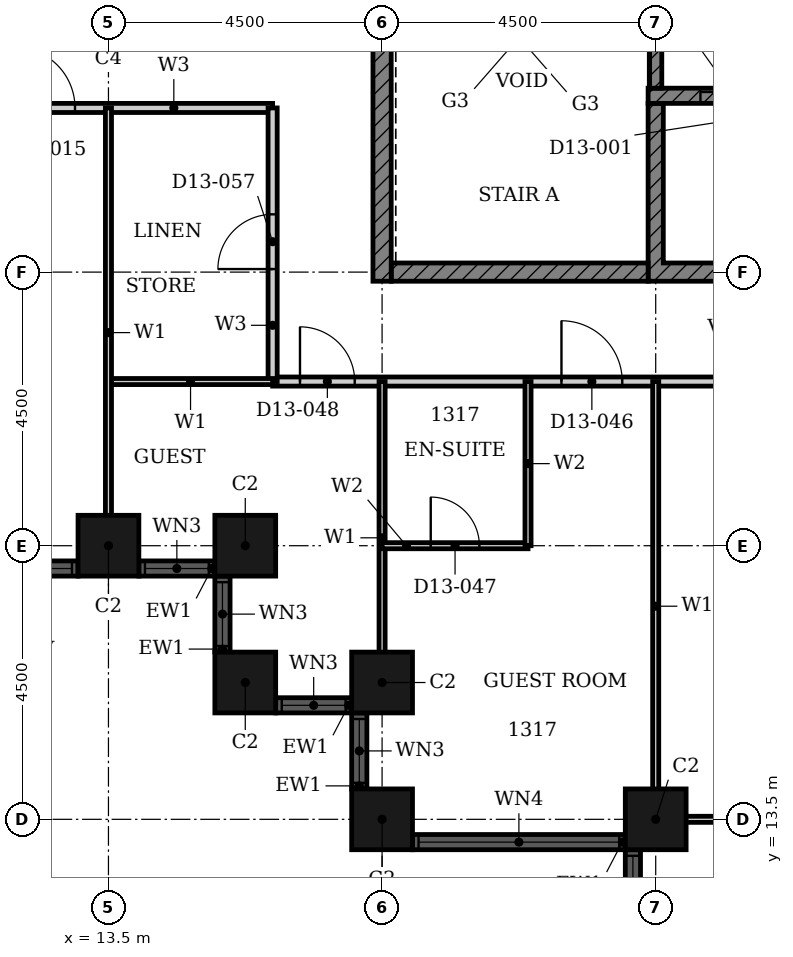
"""IFC4 building model, lengths in metres.
Left out: names, types, materials, properties, quantities, classifications, styles, units other than length and angle.
Written with IfcOpenShell. Run it as: python <this file> out.ifc"""

import sys

from ifc_helpers import new_model, si_unit, direction, frame, frame_2d, origin, origin_2d, place, context, subcontext, project, spatial, polyline, rectangle, hollow_rectangle, outline, extrude, element, fill, save


model = new_model("IFC4")
c1 = context("Model", 3, precision=1e-05, world=origin(), true_north=direction((0.0, 1.0)))
c2 = subcontext(c1, "Body", "Model", "MODEL_VIEW")
j1 = project(units=[si_unit("LENGTHUNIT", "METRE"), si_unit("PLANEANGLEUNIT", "RADIAN")], contexts=[c1])
p1 = place(None, origin())
s1 = spatial("IfcSite", under=j1, at=p1, CompositionType="ELEMENT")
p2 = place(p1, origin())
s2 = spatial("IfcBuilding", under=s1, at=p2, CompositionType="ELEMENT")
p3 = place(p2, frame((0.0, 0.0, 60.0)))
s3 = spatial("IfcBuildingStorey", under=s2, at=p3, CompositionType="ELEMENT", Elevation=60.0)
for number, where, z_axis, x_axis in (
    (1, (13.5, 18.0, 0.0), (0.0, 0.0, 1.0), (1.0, 0.0, 0.0)),
    (2, (15.75, 18.0, 0.0), (0.0, 0.0, 1.0), (1.0, 0.0, 0.0)),
    (3, (15.75, 15.75, 0.0), (0.0, 0.0, 1.0), (1.0, 0.0, 0.0)),
    (4, (18.0, 15.75, 0.0), (0.0, 0.0, 1.0), (1.0, 0.0, 0.0)),
    (5, (18.0, 13.5, 0.0), (0.0, 0.0, 1.0), (1.0, 0.0, 0.0)),
    (6, (22.5, 13.5, 0.0), (0.0, 0.0, 1.0), (1.0, 0.0, 0.0)),
):
    element("IfcColumn", number, at=place(p3, frame(where, z_axis=z_axis, x_axis=x_axis)), inside=s3, PredefinedType="COLUMN", context=c2, shape_type="SweptSolid", body=[
        extrude(hollow_rectangle(XDim=1.0, YDim=1.0, WallThickness=0.032, at=origin_2d()), origin(), (0.0, 0.0, 1.0), 3.6),
    ])
p4 = place(p3, frame((5.0, 17.625, 0.0), z_axis=(0.0, 0.0, 1.0), x_axis=(1.0, 0.0, 0.0)))
e7 = element("IfcWall", 7, at=p4, inside=s3, PredefinedType="SOLIDWALL", context=c2, shape_type="SweptSolid", body=[
    extrude(rectangle(XDim=8.0, YDim=0.25, at=frame_2d((4.0, 0.0))), origin(), (0.0, 0.0, 1.0), 3.6),
])
p5 = place(p4, frame((0.1, 0.0, 0.9)))
e8 = element("IfcOpeningElement", 8, at=p5, cuts=e7, PredefinedType="OPENING", context=c2, shape_type="SweptSolid", body=[
    extrude(rectangle(XDim=3.3, YDim=2.08, at=frame_2d((1.65, 1.04))), frame((0.0, 0.135, 0.0), z_axis=(0.0, -1.0, 0.0), x_axis=(1.0, 0.0, 0.0)), (0.0, 0.0, 1.0), 0.27),
])
p6 = place(p4, frame((4.6, 0.0, 0.9)))
e9 = element("IfcOpeningElement", 9, at=p6, cuts=e7, PredefinedType="OPENING", context=c2, shape_type="SweptSolid", body=[
    extrude(rectangle(XDim=3.3, YDim=2.08, at=frame_2d((1.65, 1.04))), frame((0.0, 0.135, 0.0), z_axis=(0.0, -1.0, 0.0), x_axis=(1.0, 0.0, 0.0)), (0.0, 0.0, 1.0), 0.27),
])
p7 = place(p3, frame((14.0, 17.625, 0.0), z_axis=(0.0, 0.0, 1.0), x_axis=(1.0, 0.0, 0.0)))
e10 = element("IfcWall", 10, at=p7, inside=s3, PredefinedType="SOLIDWALL", context=c2, shape_type="SweptSolid", body=[
    extrude(rectangle(XDim=1.25, YDim=0.25, at=frame_2d((0.625, 0.0))), origin(), (0.0, 0.0, 1.0), 3.6),
])
p8 = place(p7, frame((0.1, 0.0, 0.9)))
e11 = element("IfcOpeningElement", 11, at=p8, cuts=e10, PredefinedType="OPENING", context=c2, shape_type="SweptSolid", body=[
    extrude(rectangle(XDim=1.05, YDim=2.08, at=frame_2d((0.525, 1.04))), frame((0.0, 0.135, 0.0), z_axis=(0.0, -1.0, 0.0), x_axis=(1.0, 0.0, 0.0)), (0.0, 0.0, 1.0), 0.27),
])
p9 = place(p3, frame((15.375, 17.5, 0.0), z_axis=(0.0, 0.0, 1.0), x_axis=(0.0, -1.0, 0.0)))
e12 = element("IfcWall", 12, at=p9, inside=s3, PredefinedType="SOLIDWALL", context=c2, shape_type="SweptSolid", body=[
    extrude(rectangle(XDim=1.25, YDim=0.25, at=frame_2d((0.625, 0.0))), origin(), (0.0, 0.0, 1.0), 3.6),
])
p10 = place(p9, frame((0.1, 0.0, 0.9)))
e13 = element("IfcOpeningElement", 13, at=p10, cuts=e12, PredefinedType="OPENING", context=c2, shape_type="SweptSolid", body=[
    extrude(rectangle(XDim=1.05, YDim=2.08, at=frame_2d((0.525, 1.04))), frame((0.0, 0.135, 0.0), z_axis=(0.0, -1.0, 0.0), x_axis=(1.0, 0.0, 0.0)), (0.0, 0.0, 1.0), 0.27),
])
p11 = place(p3, frame((16.25, 15.375, 0.0), z_axis=(0.0, 0.0, 1.0), x_axis=(1.0, 0.0, 0.0)))
e14 = element("IfcWall", 14, at=p11, inside=s3, PredefinedType="SOLIDWALL", context=c2, shape_type="SweptSolid", body=[
    extrude(rectangle(XDim=1.25, YDim=0.25, at=frame_2d((0.625, 0.0))), origin(), (0.0, 0.0, 1.0), 3.6),
])
p12 = place(p11, frame((0.1, 0.0, 0.9)))
e15 = element("IfcOpeningElement", 15, at=p12, cuts=e14, PredefinedType="OPENING", context=c2, shape_type="SweptSolid", body=[
    extrude(rectangle(XDim=1.05, YDim=2.08, at=frame_2d((0.525, 1.04))), frame((0.0, 0.135, 0.0), z_axis=(0.0, -1.0, 0.0), x_axis=(1.0, 0.0, 0.0)), (0.0, 0.0, 1.0), 0.27),
])
p13 = place(p3, frame((17.625, 15.25, 0.0), z_axis=(0.0, 0.0, 1.0), x_axis=(0.0, -1.0, 0.0)))
e16 = element("IfcWall", 16, at=p13, inside=s3, PredefinedType="SOLIDWALL", context=c2, shape_type="SweptSolid", body=[
    extrude(rectangle(XDim=1.25, YDim=0.25, at=frame_2d((0.625, 0.0))), origin(), (0.0, 0.0, 1.0), 3.6),
])
p14 = place(p13, frame((0.1, 0.0, 0.9)))
e17 = element("IfcOpeningElement", 17, at=p14, cuts=e16, PredefinedType="OPENING", context=c2, shape_type="SweptSolid", body=[
    extrude(rectangle(XDim=1.05, YDim=2.08, at=frame_2d((0.525, 1.04))), frame((0.0, 0.135, 0.0), z_axis=(0.0, -1.0, 0.0), x_axis=(1.0, 0.0, 0.0)), (0.0, 0.0, 1.0), 0.27),
])
p15 = place(p3, frame((18.5, 13.125, 0.0), z_axis=(0.0, 0.0, 1.0), x_axis=(1.0, 0.0, 0.0)))
e18 = element("IfcWall", 18, at=p15, inside=s3, PredefinedType="SOLIDWALL", context=c2, shape_type="SweptSolid", body=[
    extrude(rectangle(XDim=3.5, YDim=0.25, at=frame_2d((1.75, 0.0))), origin(), (0.0, 0.0, 1.0), 3.6),
])
p16 = place(p15, frame((0.1, 0.0, 0.9)))
e19 = element("IfcOpeningElement", 19, at=p16, cuts=e18, PredefinedType="OPENING", context=c2, shape_type="SweptSolid", body=[
    extrude(rectangle(XDim=3.3, YDim=2.08, at=frame_2d((1.65, 1.04))), frame((0.0, 0.135, 0.0), z_axis=(0.0, -1.0, 0.0), x_axis=(1.0, 0.0, 0.0)), (0.0, 0.0, 1.0), 0.27),
])
p17 = place(p3, frame((22.125, 13.0, 0.0), z_axis=(0.0, 0.0, 1.0), x_axis=(0.0, -1.0, 0.0)))
e20 = element("IfcWall", 20, at=p17, inside=s3, PredefinedType="SOLIDWALL", context=c2, shape_type="SweptSolid", body=[
    extrude(rectangle(XDim=8.0, YDim=0.25, at=frame_2d((4.0, 0.0))), origin(), (0.0, 0.0, 1.0), 3.6),
])
p18 = place(p17, frame((0.1, 0.0, 0.9)))
e21 = element("IfcOpeningElement", 21, at=p18, cuts=e20, PredefinedType="OPENING", context=c2, shape_type="SweptSolid", body=[
    extrude(rectangle(XDim=3.3, YDim=2.08, at=frame_2d((1.65, 1.04))), frame((0.0, 0.135, 0.0), z_axis=(0.0, -1.0, 0.0), x_axis=(1.0, 0.0, 0.0)), (0.0, 0.0, 1.0), 0.27),
])
p19 = place(p17, frame((4.6, 0.0, 0.9)))
e22 = element("IfcOpeningElement", 22, at=p19, cuts=e20, PredefinedType="OPENING", context=c2, shape_type="SweptSolid", body=[
    extrude(rectangle(XDim=3.3, YDim=2.08, at=frame_2d((1.65, 1.04))), frame((0.0, 0.135, 0.0), z_axis=(0.0, -1.0, 0.0), x_axis=(1.0, 0.0, 0.0)), (0.0, 0.0, 1.0), 0.27),
])
p20 = place(p3, origin())
e23 = element("IfcWall", 23, at=p20, inside=s3, PredefinedType="SHEAR", context=c2, shape_type="SweptSolid", body=[
    extrude(outline(polyline([(22.375, 22.35), (38.053, 22.35), (38.053, 25.275), (37.803, 25.275), (37.803, 22.65), (35.482, 22.65), (35.482, 25.275), (35.232, 25.275), (35.232, 22.65), (32.911, 22.65), (32.911, 25.275), (32.661, 25.275), (32.661, 22.65), (30.339, 22.65), (30.339, 25.275), (30.089, 25.275), (30.089, 22.65), (27.768, 22.65), (27.768, 25.275), (27.518, 25.275), (27.518, 22.65), (25.197, 22.65), (25.197, 25.275), (24.947, 25.275), (24.947, 22.65), (22.625, 22.65), (22.625, 25.275), (22.375, 25.275), (22.375, 22.35)])), origin(), (0.0, 0.0, 1.0), 3.3),
])
p21 = place(p3, frame((18.15, 22.5, 0.0), z_axis=(0.0, 0.0, 1.0), x_axis=(1.0, 0.0, 0.0)))
e24 = element("IfcWall", 24, at=p21, inside=s3, PredefinedType="SHEAR", context=c2, shape_type="SweptSolid", body=[
    extrude(rectangle(XDim=4.225, YDim=0.3, at=frame_2d((2.113, 0.0))), origin(), (0.0, 0.0, 1.0), 3.3),
])
p22 = place(p3, frame((18.0, 22.35, 0.0), z_axis=(0.0, 0.0, 1.0), x_axis=(0.0, 1.0, 0.0)))
e25 = element("IfcWall", 25, at=p22, inside=s3, PredefinedType="SHEAR", context=c2, shape_type="SweptSolid", body=[
    extrude(rectangle(XDim=9.3, YDim=0.3, at=frame_2d((4.65, 0.0))), origin(), (0.0, 0.0, 1.0), 3.3),
])
p23 = place(p3, frame((22.375, 25.4, 0.0), z_axis=(0.0, 0.0, 1.0), x_axis=(1.0, 0.0, 0.0)))
e26 = element("IfcWall", 26, at=p23, inside=s3, PredefinedType="SHEAR", context=c2, shape_type="SweptSolid", body=[
    extrude(rectangle(XDim=15.678, YDim=0.25, at=frame_2d((7.839, 0.0))), origin(), (0.0, 0.0, 1.0), 3.3),
])
p24 = place(p23, frame((3.432, 0.0, 0.0)))
e27 = element("IfcOpeningElement", 27, at=p24, cuts=e26, PredefinedType="OPENING", context=c2, shape_type="SweptSolid", body=[
    extrude(rectangle(XDim=1.1, YDim=2.1, at=frame_2d((0.55, 1.05))), frame((0.0, 0.135, 0.0), z_axis=(0.0, -1.0, 0.0), x_axis=(1.0, 0.0, 0.0)), (0.0, 0.0, 1.0), 0.27),
])
p25 = place(p23, frame((11.146, 0.0, 0.0)))
e28 = element("IfcOpeningElement", 28, at=p25, cuts=e26, PredefinedType="OPENING", context=c2, shape_type="SweptSolid", body=[
    extrude(rectangle(XDim=1.1, YDim=2.1, at=frame_2d((0.55, 1.05))), frame((0.0, 0.135, 0.0), z_axis=(0.0, -1.0, 0.0), x_axis=(1.0, 0.0, 0.0)), (0.0, 0.0, 1.0), 0.27),
])
p26 = place(p23, frame((13.718, 0.0, 0.0)))
e29 = element("IfcOpeningElement", 29, at=p26, cuts=e26, PredefinedType="OPENING", context=c2, shape_type="SweptSolid", body=[
    extrude(rectangle(XDim=1.1, YDim=2.1, at=frame_2d((0.55, 1.05))), frame((0.0, 0.135, 0.0), z_axis=(0.0, -1.0, 0.0), x_axis=(1.0, 0.0, 0.0)), (0.0, 0.0, 1.0), 0.27),
])
p27 = place(p23, frame((0.861, 0.0, 0.0)))
e30 = element("IfcOpeningElement", 30, at=p27, cuts=e26, PredefinedType="OPENING", context=c2, shape_type="SweptSolid", body=[
    extrude(rectangle(XDim=1.1, YDim=2.1, at=frame_2d((0.55, 1.05))), frame((0.0, 0.135, 0.0), z_axis=(0.0, -1.0, 0.0), x_axis=(1.0, 0.0, 0.0)), (0.0, 0.0, 1.0), 0.27),
])
p28 = place(p3, frame((22.5, 31.35, 0.0), z_axis=(0.0, 0.0, 1.0), x_axis=(0.0, -1.0, 0.0)))
e31 = element("IfcWall", 31, at=p28, inside=s3, PredefinedType="SHEAR", context=c2, shape_type="SweptSolid", body=[
    extrude(rectangle(XDim=5.825, YDim=0.2, at=frame_2d((2.913, 0.0))), origin(), (0.0, 0.0, 1.0), 3.3),
])
p29 = place(p28, frame((0.25, 0.0, 0.0)))
e32 = element("IfcOpeningElement", 32, at=p29, cuts=e31, PredefinedType="OPENING", context=c2, shape_type="SweptSolid", body=[
    extrude(rectangle(XDim=1.8, YDim=2.1, at=frame_2d((0.9, 1.05))), frame((0.0, 0.11, 0.0), z_axis=(0.0, -1.0, 0.0), x_axis=(1.0, 0.0, 0.0)), (0.0, 0.0, 1.0), 0.22),
])
p30 = place(p3, frame((16.2, 20.7, 0.0), z_axis=(0.0, 0.0, 1.0), x_axis=(1.0, 0.0, 0.0)))
e33 = element("IfcWall", 33, at=p30, inside=s3, PredefinedType="PARTITIONING", context=c2, shape_type="SweptSolid", body=[
    extrude(rectangle(XDim=13.5, YDim=0.15, at=frame_2d((6.75, 0.0))), origin(), (0.0, 0.0, 1.0), 3.3),
])
p31 = place(p30, frame((4.75, 0.0, 0.0)))
e34 = element("IfcOpeningElement", 34, at=p31, cuts=e33, PredefinedType="OPENING", context=c2, shape_type="SweptSolid", body=[
    extrude(rectangle(XDim=1.0, YDim=2.1, at=frame_2d((0.5, 1.05))), frame((0.0, 0.085, 0.0), z_axis=(0.0, -1.0, 0.0), x_axis=(1.0, 0.0, 0.0)), (0.0, 0.0, 1.0), 0.17),
])
p32 = place(p30, frame((0.45, 0.0, 0.0)))
e35 = element("IfcOpeningElement", 35, at=p32, cuts=e33, PredefinedType="OPENING", context=c2, shape_type="SweptSolid", body=[
    extrude(rectangle(XDim=0.9, YDim=2.1, at=frame_2d((0.45, 1.05))), frame((0.0, 0.085, 0.0), z_axis=(0.0, -1.0, 0.0), x_axis=(1.0, 0.0, 0.0)), (0.0, 0.0, 1.0), 0.17),
])
p33 = place(p30, frame((9.45, 0.0, 0.0)))
e36 = element("IfcOpeningElement", 36, at=p33, cuts=e33, PredefinedType="OPENING", context=c2, shape_type="SweptSolid", body=[
    extrude(rectangle(XDim=0.9, YDim=2.1, at=frame_2d((0.45, 1.05))), frame((0.0, 0.085, 0.0), z_axis=(0.0, -1.0, 0.0), x_axis=(1.0, 0.0, 0.0)), (0.0, 0.0, 1.0), 0.17),
])
p34 = place(p3, frame((9.0, 25.2, 0.0), z_axis=(0.0, 0.0, 1.0), x_axis=(1.0, 0.0, 0.0)))
e37 = element("IfcWall", 37, at=p34, inside=s3, PredefinedType="PARTITIONING", context=c2, shape_type="SweptSolid", body=[
    extrude(rectangle(XDim=7.2, YDim=0.15, at=frame_2d((3.6, 0.0))), origin(), (0.0, 0.0, 1.0), 3.3),
])
p35 = place(p34, frame((2.95, 0.0, 0.0)))
e38 = element("IfcOpeningElement", 38, at=p35, cuts=e37, PredefinedType="OPENING", context=c2, shape_type="SweptSolid", body=[
    extrude(rectangle(XDim=1.0, YDim=2.1, at=frame_2d((0.5, 1.05))), frame((0.0, 0.085, 0.0), z_axis=(0.0, -1.0, 0.0), x_axis=(1.0, 0.0, 0.0)), (0.0, 0.0, 1.0), 0.17),
])
p36 = place(p3, frame((16.2, 20.7, 0.0), z_axis=(0.0, 0.0, 1.0), x_axis=(0.0, 1.0, 0.0)))
e39 = element("IfcWall", 39, at=p36, inside=s3, PredefinedType="PARTITIONING", context=c2, shape_type="SweptSolid", body=[
    extrude(rectangle(XDim=4.5, YDim=0.15, at=frame_2d((2.25, 0.0))), origin(), (0.0, 0.0, 1.0), 3.3),
])
p37 = place(p36, frame((1.85, 0.0, 0.0)))
e40 = element("IfcOpeningElement", 40, at=p37, cuts=e39, PredefinedType="OPENING", context=c2, shape_type="SweptSolid", body=[
    extrude(rectangle(XDim=0.9, YDim=2.1, at=frame_2d((0.45, 1.05))), frame((0.0, 0.085, 0.0), z_axis=(0.0, -1.0, 0.0), x_axis=(1.0, 0.0, 0.0)), (0.0, 0.0, 1.0), 0.17),
])
p38 = place(p3, frame((22.31, 13.5, 0.0), z_axis=(0.0, 0.0, 1.0), x_axis=(1.0, 0.0, 0.0)))
e41 = element("IfcWall", 41, at=p38, inside=s3, PredefinedType="PARTITIONING", context=c2, shape_type="SweptSolid", body=[
    extrude(rectangle(XDim=7.39, YDim=0.1, at=frame_2d((3.695, 0.0))), origin(), (0.0, 0.0, 1.0), 2.38),
])
p39 = place(p3, frame((13.5, 20.7, 0.0), z_axis=(0.0, 0.0, 1.0), x_axis=(1.0, 0.0, 0.0)))
e42 = element("IfcWall", 42, at=p39, inside=s3, PredefinedType="PARTITIONING", context=c2, shape_type="SweptSolid", body=[
    extrude(rectangle(XDim=2.7, YDim=0.1, at=frame_2d((1.35, 0.0))), origin(), (0.0, 0.0, 1.0), 3.3),
])
p40 = place(p3, frame((13.5, 17.81, 0.0), z_axis=(0.0, 0.0, 1.0), x_axis=(0.0, 1.0, 0.0)))
e43 = element("IfcWall", 43, at=p40, inside=s3, PredefinedType="PARTITIONING", context=c2, shape_type="SweptSolid", body=[
    extrude(rectangle(XDim=7.39, YDim=0.1, at=frame_2d((3.695, 0.0))), origin(), (0.0, 0.0, 1.0), 2.38),
])
p41 = place(p3, frame((18.0, 15.56, 0.0), z_axis=(0.0, 0.0, 1.0), x_axis=(0.0, 1.0, 0.0)))
e44 = element("IfcWall", 44, at=p41, inside=s3, PredefinedType="PARTITIONING", context=c2, shape_type="SweptSolid", body=[
    extrude(rectangle(XDim=5.14, YDim=0.1, at=frame_2d((2.57, 0.0))), origin(), (0.0, 0.0, 1.0), 3.3),
])
p42 = place(p3, frame((22.5, 13.31, 0.0), z_axis=(0.0, 0.0, 1.0), x_axis=(0.0, 1.0, 0.0)))
e45 = element("IfcWall", 45, at=p42, inside=s3, PredefinedType="PARTITIONING", context=c2, shape_type="SweptSolid", body=[
    extrude(rectangle(XDim=7.39, YDim=0.1, at=frame_2d((3.695, 0.0))), origin(), (0.0, 0.0, 1.0), 3.3),
])
p43 = place(p3, frame((18.0, 18.0, 0.0), z_axis=(0.0, 0.0, 1.0), x_axis=(1.0, 0.0, 0.0)))
e46 = element("IfcWall", 46, at=p43, inside=s3, PredefinedType="PARTITIONING", context=c2, shape_type="SweptSolid", body=[
    extrude(rectangle(XDim=2.4, YDim=0.1, at=frame_2d((1.2, 0.0))), origin(), (0.0, 0.0, 1.0), 3.3),
])
p44 = place(p43, frame((0.8, 0.0, 0.0)))
e47 = element("IfcOpeningElement", 47, at=p44, cuts=e46, PredefinedType="OPENING", context=c2, shape_type="SweptSolid", body=[
    extrude(rectangle(XDim=0.8, YDim=2.1, at=frame_2d((0.4, 1.05))), frame((0.0, 0.06, 0.0), z_axis=(0.0, -1.0, 0.0), x_axis=(1.0, 0.0, 0.0)), (0.0, 0.0, 1.0), 0.12),
])
p45 = place(p3, frame((20.4, 18.0, 0.0), z_axis=(0.0, 0.0, 1.0), x_axis=(0.0, 1.0, 0.0)))
e48 = element("IfcWall", 48, at=p45, inside=s3, PredefinedType="PARTITIONING", context=c2, shape_type="SweptSolid", body=[
    extrude(rectangle(XDim=2.7, YDim=0.1, at=frame_2d((1.35, 0.0))), origin(), (0.0, 0.0, 1.0), 3.3),
])
p46 = place(p6, origin())
e49 = element("IfcWindow", 49, at=p46, inside=s3, PartitioningType="SINGLE_PANEL", PredefinedType="WINDOW", context=c2, shape_type="SweptSolid", body=[
    extrude(rectangle(XDim=3.3, YDim=2.08, at=frame_2d((1.65, 1.04))), frame((0.0, 0.03, 0.0), z_axis=(0.0, -1.0, 0.0), x_axis=(1.0, 0.0, 0.0)), (0.0, 0.0, 1.0), 0.06),
])
fill(e9, e49)
p47 = place(p8, origin())
e50 = element("IfcWindow", 50, at=p47, inside=s3, PartitioningType="SINGLE_PANEL", PredefinedType="WINDOW", context=c2, shape_type="SweptSolid", body=[
    extrude(rectangle(XDim=1.05, YDim=2.08, at=frame_2d((0.525, 1.04))), frame((0.0, 0.03, 0.0), z_axis=(0.0, -1.0, 0.0), x_axis=(1.0, 0.0, 0.0)), (0.0, 0.0, 1.0), 0.06),
])
fill(e11, e50)
p48 = place(p10, origin())
e51 = element("IfcWindow", 51, at=p48, inside=s3, PartitioningType="SINGLE_PANEL", PredefinedType="WINDOW", context=c2, shape_type="SweptSolid", body=[
    extrude(rectangle(XDim=1.05, YDim=2.08, at=frame_2d((0.525, 1.04))), frame((0.0, 0.03, 0.0), z_axis=(0.0, -1.0, 0.0), x_axis=(1.0, 0.0, 0.0)), (0.0, 0.0, 1.0), 0.06),
])
fill(e13, e51)
p49 = place(p12, origin())
e52 = element("IfcWindow", 52, at=p49, inside=s3, PartitioningType="SINGLE_PANEL", PredefinedType="WINDOW", context=c2, shape_type="SweptSolid", body=[
    extrude(rectangle(XDim=1.05, YDim=2.08, at=frame_2d((0.525, 1.04))), frame((0.0, 0.03, 0.0), z_axis=(0.0, -1.0, 0.0), x_axis=(1.0, 0.0, 0.0)), (0.0, 0.0, 1.0), 0.06),
])
fill(e15, e52)
p50 = place(p14, origin())
e53 = element("IfcWindow", 53, at=p50, inside=s3, PartitioningType="SINGLE_PANEL", PredefinedType="WINDOW", context=c2, shape_type="SweptSolid", body=[
    extrude(rectangle(XDim=1.05, YDim=2.08, at=frame_2d((0.525, 1.04))), frame((0.0, 0.03, 0.0), z_axis=(0.0, -1.0, 0.0), x_axis=(1.0, 0.0, 0.0)), (0.0, 0.0, 1.0), 0.06),
])
fill(e17, e53)
p51 = place(p16, origin())
e54 = element("IfcWindow", 54, at=p51, inside=s3, PartitioningType="SINGLE_PANEL", PredefinedType="WINDOW", context=c2, shape_type="SweptSolid", body=[
    extrude(rectangle(XDim=3.3, YDim=2.08, at=frame_2d((1.65, 1.04))), frame((0.0, 0.03, 0.0), z_axis=(0.0, -1.0, 0.0), x_axis=(1.0, 0.0, 0.0)), (0.0, 0.0, 1.0), 0.06),
])
fill(e19, e54)
p52 = place(p18, origin())
e55 = element("IfcWindow", 55, at=p52, inside=s3, PartitioningType="SINGLE_PANEL", PredefinedType="WINDOW", context=c2, shape_type="SweptSolid", body=[
    extrude(rectangle(XDim=3.3, YDim=2.08, at=frame_2d((1.65, 1.04))), frame((0.0, 0.03, 0.0), z_axis=(0.0, -1.0, 0.0), x_axis=(1.0, 0.0, 0.0)), (0.0, 0.0, 1.0), 0.06),
])
fill(e21, e55)
p53 = place(p27, origin())
e56 = element("IfcDoor", 56, at=p53, inside=s3, OperationType="DOUBLE_DOOR_SLIDING", PredefinedType="DOOR", context=c2, shape_type="SweptSolid", body=[
    extrude(rectangle(XDim=1.1, YDim=2.1, at=frame_2d((0.55, 1.05))), frame((0.0, 0.025, 0.0), z_axis=(0.0, -1.0, 0.0), x_axis=(1.0, 0.0, 0.0)), (0.0, 0.0, 1.0), 0.05),
])
fill(e30, e56)
p54 = place(p35, origin())
e57 = element("IfcDoor", 57, at=p54, inside=s3, OperationType="SINGLE_SWING_RIGHT", PredefinedType="DOOR", context=c2, shape_type="SweptSolid", body=[
    extrude(rectangle(XDim=1.0, YDim=2.1, at=frame_2d((0.5, 1.05))), frame((0.0, 0.025, 0.0), z_axis=(0.0, -1.0, 0.0), x_axis=(1.0, 0.0, 0.0)), (0.0, 0.0, 1.0), 0.05),
])
fill(e38, e57)
p55 = place(p31, origin())
e58 = element("IfcDoor", 58, at=p55, inside=s3, OperationType="SINGLE_SWING_RIGHT", PredefinedType="DOOR", context=c2, shape_type="SweptSolid", body=[
    extrude(rectangle(XDim=1.0, YDim=2.1, at=frame_2d((0.5, 1.05))), frame((0.0, 0.025, 0.0), z_axis=(0.0, -1.0, 0.0), x_axis=(1.0, 0.0, 0.0)), (0.0, 0.0, 1.0), 0.05),
])
fill(e34, e58)
p56 = place(p44, origin())
e59 = element("IfcDoor", 59, at=p56, inside=s3, OperationType="SINGLE_SWING_LEFT", PredefinedType="DOOR", context=c2, shape_type="SweptSolid", body=[
    extrude(rectangle(XDim=0.8, YDim=2.1, at=frame_2d((0.4, 1.05))), frame((0.0, 0.025, 0.0), z_axis=(0.0, -1.0, 0.0), x_axis=(1.0, 0.0, 0.0)), (0.0, 0.0, 1.0), 0.05),
])
fill(e47, e59)
p57 = place(p32, origin())
e60 = element("IfcDoor", 60, at=p57, inside=s3, OperationType="SINGLE_SWING_LEFT", PredefinedType="DOOR", context=c2, shape_type="SweptSolid", body=[
    extrude(rectangle(XDim=0.9, YDim=2.1, at=frame_2d((0.45, 1.05))), frame((0.0, 0.025, 0.0), z_axis=(0.0, -1.0, 0.0), x_axis=(1.0, 0.0, 0.0)), (0.0, 0.0, 1.0), 0.05),
])
fill(e35, e60)
p58 = place(p37, origin())
e61 = element("IfcDoor", 61, at=p58, inside=s3, OperationType="SINGLE_SWING_RIGHT", PredefinedType="DOOR", context=c2, shape_type="SweptSolid", body=[
    extrude(rectangle(XDim=0.9, YDim=2.1, at=frame_2d((0.45, 1.05))), frame((0.0, 0.025, 0.0), z_axis=(0.0, -1.0, 0.0), x_axis=(1.0, 0.0, 0.0)), (0.0, 0.0, 1.0), 0.05),
])
fill(e40, e61)
save(model, sys.argv[1])
